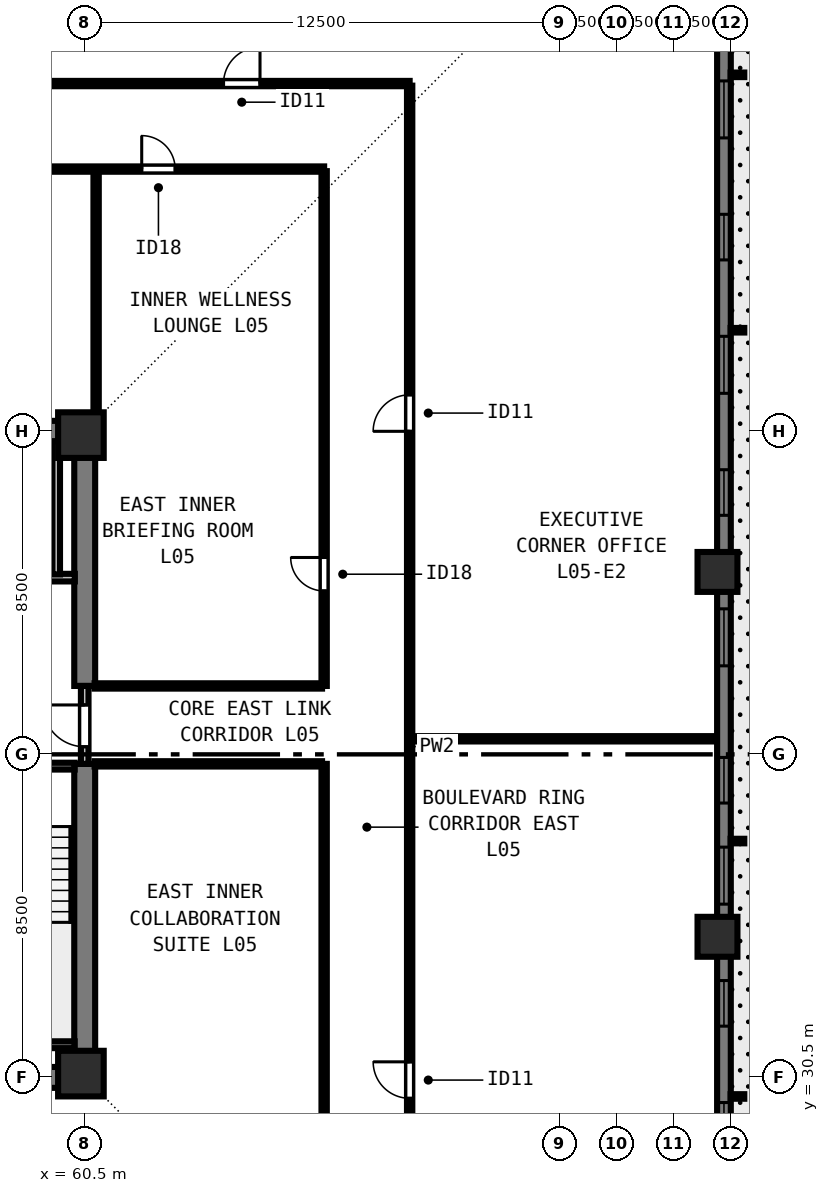
"""IFC4 building model, lengths in metres.
Left out: names, types, materials, properties, quantities, classifications, styles, units other than length and angle.
Written with IfcOpenShell. Run it as: python <this file> out.ifc"""

import sys

from ifc_helpers import new_model, si_unit, direction, frame, frame_2d, origin, origin_2d, place, context, subcontext, project, spatial, rectangle, extrude, element, fill, save


model = new_model("IFC4")
c1 = context("Model", 3, precision=1e-05, world=origin(), true_north=direction((0.0, 1.0)))
c2 = subcontext(c1, "Body", "Model", "MODEL_VIEW")
j1 = project(units=[si_unit("LENGTHUNIT", "METRE"), si_unit("PLANEANGLEUNIT", "RADIAN")], contexts=[c1])
p1 = place(None, origin())
s1 = spatial("IfcSite", under=j1, at=p1, CompositionType="ELEMENT")
p2 = place(p1, origin())
s2 = spatial("IfcBuilding", under=s1, at=p2, CompositionType="ELEMENT")
p3 = place(p2, frame((0.0, 0.0, 23.5)))
s3 = spatial("IfcBuildingStorey", under=s2, at=p3, CompositionType="ELEMENT", Elevation=23.5)
for number, where, z_axis, x_axis in (
    (1, (60.4, 30.6, 0.0), (0.0, 0.0, 1.0), (1.0, 0.0, 0.0)),
    (2, (60.4, 47.4, 0.0), (0.0, 0.0, 1.0), (1.0, 0.0, 0.0)),
):
    element("IfcColumn", number, at=place(p3, frame(where, z_axis=z_axis, x_axis=x_axis)), inside=s3, PredefinedType="COLUMN", context=c2, shape_type="SweptSolid", body=[
        extrude(rectangle(XDim=1.2, YDim=1.2, at=origin_2d()), origin(), (0.0, 0.0, 1.0), 3.5),
    ])
for number, where, z_axis, x_axis in (
    (3, (77.15, 34.2, 0.0), (0.0, 0.0, 1.0), (0.0, 1.0, 0.0)),
    (4, (77.15, 43.8, 0.0), (0.0, 0.0, 1.0), (0.0, 1.0, 0.0)),
):
    element("IfcColumn", number, at=place(p3, frame(where, z_axis=z_axis, x_axis=x_axis)), inside=s3, PredefinedType="COLUMN", context=c2, shape_type="SweptSolid", body=[
        extrude(rectangle(XDim=1.05, YDim=1.05, at=origin_2d()), origin(), (0.0, 0.0, 1.0), 3.5),
    ])
p4 = place(p3, frame((77.32, 61.5, 0.0), z_axis=(0.0, 0.0, 1.0), x_axis=(0.0, -1.0, 0.0)))
e5 = element("IfcWall", 5, at=p4, inside=s3, PredefinedType="SOLIDWALL", context=c2, shape_type="SweptSolid", body=[
    extrude(rectangle(XDim=44.662, YDim=0.36, at=frame_2d((22.331, 0.0))), origin(), (0.0, 0.0, 1.0), 3.28),
])
p5 = place(p4, frame((4.78, 0.0, 0.8)))
e6 = element("IfcOpeningElement", 6, at=p5, cuts=e5, PredefinedType="OPENING", context=c2, shape_type="SweptSolid", body=[
    extrude(rectangle(XDim=1.5, YDim=1.544, at=frame_2d((0.75, 0.772))), frame((0.0, 0.19, 0.0), z_axis=(0.0, -1.0, 0.0), x_axis=(1.0, 0.0, 0.0)), (0.0, 0.0, 1.0), 0.38),
])
p6 = place(p4, frame((8.29, 0.0, 0.8)))
e7 = element("IfcOpeningElement", 7, at=p6, cuts=e5, PredefinedType="OPENING", context=c2, shape_type="SweptSolid", body=[
    extrude(rectangle(XDim=1.2, YDim=1.544, at=frame_2d((0.6, 0.772))), frame((0.0, 0.19, 0.0), z_axis=(0.0, -1.0, 0.0), x_axis=(1.0, 0.0, 0.0)), (0.0, 0.0, 1.0), 0.38),
])
p7 = place(p4, frame((11.5, 0.0, 0.8)))
e8 = element("IfcOpeningElement", 8, at=p7, cuts=e5, PredefinedType="OPENING", context=c2, shape_type="SweptSolid", body=[
    extrude(rectangle(XDim=1.5, YDim=1.544, at=frame_2d((0.75, 0.772))), frame((0.0, 0.19, 0.0), z_axis=(0.0, -1.0, 0.0), x_axis=(1.0, 0.0, 0.0)), (0.0, 0.0, 1.0), 0.38),
])
p8 = place(p4, frame((15.01, 0.0, 0.8)))
e9 = element("IfcOpeningElement", 9, at=p8, cuts=e5, PredefinedType="OPENING", context=c2, shape_type="SweptSolid", body=[
    extrude(rectangle(XDim=1.2, YDim=1.544, at=frame_2d((0.6, 0.772))), frame((0.0, 0.19, 0.0), z_axis=(0.0, -1.0, 0.0), x_axis=(1.0, 0.0, 0.0)), (0.0, 0.0, 1.0), 0.38),
])
p9 = place(p4, frame((18.671, 0.0, 0.8)))
e10 = element("IfcOpeningElement", 10, at=p9, cuts=e5, PredefinedType="OPENING", context=c2, shape_type="SweptSolid", body=[
    extrude(rectangle(XDim=1.5, YDim=1.544, at=frame_2d((0.75, 0.772))), frame((0.0, 0.19, 0.0), z_axis=(0.0, -1.0, 0.0), x_axis=(1.0, 0.0, 0.0)), (0.0, 0.0, 1.0), 0.38),
])
p10 = place(p4, frame((22.581, 0.0, 0.8)))
e11 = element("IfcOpeningElement", 11, at=p10, cuts=e5, PredefinedType="OPENING", context=c2, shape_type="SweptSolid", body=[
    extrude(rectangle(XDim=1.2, YDim=1.544, at=frame_2d((0.6, 0.772))), frame((0.0, 0.19, 0.0), z_axis=(0.0, -1.0, 0.0), x_axis=(1.0, 0.0, 0.0)), (0.0, 0.0, 1.0), 0.38),
])
p11 = place(p4, frame((24.941, 0.0, 0.8)))
e12 = element("IfcOpeningElement", 12, at=p11, cuts=e5, PredefinedType="OPENING", context=c2, shape_type="SweptSolid", body=[
    extrude(rectangle(XDim=1.5, YDim=1.544, at=frame_2d((0.75, 0.772))), frame((0.0, 0.19, 0.0), z_axis=(0.0, -1.0, 0.0), x_axis=(1.0, 0.0, 0.0)), (0.0, 0.0, 1.0), 0.38),
])
p12 = place(p4, frame((28.451, 0.0, 0.8)))
e13 = element("IfcOpeningElement", 13, at=p12, cuts=e5, PredefinedType="OPENING", context=c2, shape_type="SweptSolid", body=[
    extrude(rectangle(XDim=1.2, YDim=1.544, at=frame_2d((0.6, 0.772))), frame((0.0, 0.19, 0.0), z_axis=(0.0, -1.0, 0.0), x_axis=(1.0, 0.0, 0.0)), (0.0, 0.0, 1.0), 0.38),
])
p13 = place(p4, frame((31.662, 0.0, 0.8)))
e14 = element("IfcOpeningElement", 14, at=p13, cuts=e5, PredefinedType="OPENING", context=c2, shape_type="SweptSolid", body=[
    extrude(rectangle(XDim=1.5, YDim=1.544, at=frame_2d((0.75, 0.772))), frame((0.0, 0.19, 0.0), z_axis=(0.0, -1.0, 0.0), x_axis=(1.0, 0.0, 0.0)), (0.0, 0.0, 1.0), 0.38),
])
p14 = place(p4, frame((35.172, 0.0, 0.8)))
e15 = element("IfcOpeningElement", 15, at=p14, cuts=e5, PredefinedType="OPENING", context=c2, shape_type="SweptSolid", body=[
    extrude(rectangle(XDim=1.2, YDim=1.544, at=frame_2d((0.6, 0.772))), frame((0.0, 0.19, 0.0), z_axis=(0.0, -1.0, 0.0), x_axis=(1.0, 0.0, 0.0)), (0.0, 0.0, 1.0), 0.38),
])
p15 = place(p4, frame((38.382, 0.0, 0.8)))
e16 = element("IfcOpeningElement", 16, at=p15, cuts=e5, PredefinedType="OPENING", context=c2, shape_type="SweptSolid", body=[
    extrude(rectangle(XDim=1.5, YDim=1.544, at=frame_2d((0.75, 0.772))), frame((0.0, 0.19, 0.0), z_axis=(0.0, -1.0, 0.0), x_axis=(1.0, 0.0, 0.0)), (0.0, 0.0, 1.0), 0.38),
])
for number, where, z_axis, x_axis in (
    (17, (43.225, 30.5, 0.0), (0.0, 0.0, 1.0), (1.0, 0.0, 0.0)),
    (18, (43.225, 47.5, 0.0), (0.0, 0.0, 1.0), (1.0, 0.0, 0.0)),
):
    element("IfcWall", number, at=place(p3, frame(where, z_axis=z_axis, x_axis=x_axis)), inside=s3, PredefinedType="SHEAR", context=c2, shape_type="SweptSolid", body=[
        extrude(rectangle(XDim=17.55, YDim=0.55, at=frame_2d((8.775, 0.0))), origin(), (0.0, 0.0, 1.0), 3.28),
    ])
p16 = place(p3, frame((60.5, 30.765, 0.0), z_axis=(0.0, 0.0, 1.0), x_axis=(0.0, 1.0, 0.0)))
e19 = element("IfcWall", 19, at=p16, inside=s3, PredefinedType="SHEAR", context=c2, shape_type="SweptSolid", body=[
    extrude(rectangle(XDim=7.985, YDim=0.55, at=frame_2d((3.993, 0.0))), origin(), (0.0, 0.0, 1.0), 3.28),
])
p17 = place(p3, frame((60.5, 40.8, 0.0), z_axis=(0.0, 0.0, 1.0), x_axis=(0.0, 1.0, 0.0)))
e20 = element("IfcWall", 20, at=p17, inside=s3, PredefinedType="SHEAR", context=c2, shape_type="SweptSolid", body=[
    extrude(rectangle(XDim=6.435, YDim=0.55, at=frame_2d((3.218, 0.0))), origin(), (0.0, 0.0, 1.0), 3.28),
])
p18 = place(p3, frame((60.5, 38.75, 0.0), z_axis=(0.0, 0.0, 1.0), x_axis=(0.0, 1.0, 0.0)))
e21 = element("IfcWall", 21, at=p18, inside=s3, PredefinedType="SOLIDWALL", context=c2, shape_type="SweptSolid", body=[
    extrude(rectangle(XDim=2.05, YDim=0.2, at=frame_2d((1.025, 0.0))), origin(), (0.0, 0.0, 1.0), 3.28),
])
p19 = place(p18, frame((0.45, 0.0, 0.0)))
e22 = element("IfcOpeningElement", 22, at=p19, cuts=e21, PredefinedType="OPENING", context=c2, shape_type="SweptSolid", body=[
    extrude(rectangle(XDim=1.1, YDim=2.15, at=frame_2d((0.55, 1.075))), frame((0.0, 0.11, 0.0), z_axis=(0.0, -1.0, 0.0), x_axis=(1.0, 0.0, 0.0)), (0.0, 0.0, 1.0), 0.22),
])
p20 = place(p3, frame((56.735, 43.65, 0.0), z_axis=(0.0, 0.0, 1.0), x_axis=(1.0, 0.0, 0.0)))
e23 = element("IfcWall", 23, at=p20, inside=s3, PredefinedType="SOLIDWALL", context=c2, shape_type="SweptSolid", body=[
    extrude(rectangle(XDim=3.505, YDim=0.2, at=frame_2d((1.752, 0.0))), origin(), (0.0, 0.0, 1.0), 3.28),
])
p21 = place(p20, frame((1.295, 0.0, 0.0)))
e24 = element("IfcOpeningElement", 24, at=p21, cuts=e23, PredefinedType="OPENING", context=c2, shape_type="SweptSolid", body=[
    extrude(rectangle(XDim=1.1, YDim=2.2, at=frame_2d((0.55, 1.1))), frame((0.0, 0.11, 0.0), z_axis=(0.0, -1.0, 0.0), x_axis=(1.0, 0.0, 0.0)), (0.0, 0.0, 1.0), 0.22),
])
p22 = place(p3, frame((59.75, 43.735, 0.0), z_axis=(0.0, 0.0, 1.0), x_axis=(0.0, 1.0, 0.0)))
e25 = element("IfcWall", 25, at=p22, inside=s3, PredefinedType="SOLIDWALL", context=c2, shape_type="SweptSolid", body=[
    extrude(rectangle(XDim=3.505, YDim=0.2, at=frame_2d((1.752, 0.0))), origin(), (0.0, 0.0, 1.0), 3.28),
])
p23 = place(p3, frame((34.95, 56.65, 0.0), z_axis=(0.0, 0.0, 1.0), x_axis=(1.0, 0.0, 0.0)))
e26 = element("IfcWall", 26, at=p23, inside=s3, PredefinedType="PARTITIONING", context=c2, shape_type="SweptSolid", body=[
    extrude(rectangle(XDim=34.1, YDim=0.14, at=frame_2d((17.05, 0.0))), origin(), (0.0, 0.0, 1.0), 3.28),
])
p24 = place(p23, frame((4.522, 0.0, 0.0)))
e27 = element("IfcOpeningElement", 27, at=p24, cuts=e26, PredefinedType="OPENING", context=c2, shape_type="SweptSolid", body=[
    extrude(rectangle(XDim=0.96, YDim=2.12, at=frame_2d((0.48, 1.06))), frame((0.0, 0.08, 0.0), z_axis=(0.0, -1.0, 0.0), x_axis=(1.0, 0.0, 0.0)), (0.0, 0.0, 1.0), 0.16),
])
p25 = place(p23, frame((29.202, 0.0, 0.0)))
e28 = element("IfcOpeningElement", 28, at=p25, cuts=e26, PredefinedType="OPENING", context=c2, shape_type="SweptSolid", body=[
    extrude(rectangle(XDim=0.96, YDim=2.12, at=frame_2d((0.48, 1.06))), frame((0.0, 0.08, 0.0), z_axis=(0.0, -1.0, 0.0), x_axis=(1.0, 0.0, 0.0)), (0.0, 0.0, 1.0), 0.16),
])
p26 = place(p3, frame((69.05, 21.405, 0.0), z_axis=(0.0, 0.0, 1.0), x_axis=(0.0, 1.0, 0.0)))
e29 = element("IfcWall", 29, at=p26, inside=s3, PredefinedType="PARTITIONING", context=c2, shape_type="SweptSolid", body=[
    extrude(rectangle(XDim=35.19, YDim=0.14, at=frame_2d((17.595, 0.0))), origin(), (0.0, 0.0, 1.0), 3.28),
])
p27 = place(p26, frame((8.545, 0.0, 0.0)))
e30 = element("IfcOpeningElement", 30, at=p27, cuts=e29, PredefinedType="OPENING", context=c2, shape_type="SweptSolid", body=[
    extrude(rectangle(XDim=0.96, YDim=2.12, at=frame_2d((0.48, 1.06))), frame((0.0, 0.08, 0.0), z_axis=(0.0, -1.0, 0.0), x_axis=(1.0, 0.0, 0.0)), (0.0, 0.0, 1.0), 0.16),
])
p28 = place(p26, frame((26.095, 0.0, 0.0)))
e31 = element("IfcOpeningElement", 31, at=p28, cuts=e29, PredefinedType="OPENING", context=c2, shape_type="SweptSolid", body=[
    extrude(rectangle(XDim=0.96, YDim=2.12, at=frame_2d((0.48, 1.06))), frame((0.0, 0.08, 0.0), z_axis=(0.0, -1.0, 0.0), x_axis=(1.0, 0.0, 0.0)), (0.0, 0.0, 1.0), 0.16),
])
p29 = place(p3, frame((37.2, 54.4, 0.0), z_axis=(0.0, 0.0, 1.0), x_axis=(1.0, 0.0, 0.0)))
e32 = element("IfcWall", 32, at=p29, inside=s3, PredefinedType="PARTITIONING", context=c2, shape_type="SweptSolid", body=[
    extrude(rectangle(XDim=29.6, YDim=0.14, at=frame_2d((14.8, 0.0))), origin(), (0.0, 0.0, 1.0), 3.28),
])
p30 = place(p29, frame((2.2, 0.0, 0.0)))
e33 = element("IfcOpeningElement", 33, at=p30, cuts=e32, PredefinedType="OPENING", context=c2, shape_type="SweptSolid", body=[
    extrude(rectangle(XDim=0.88, YDim=2.1, at=frame_2d((0.44, 1.05))), frame((0.0, 0.08, 0.0), z_axis=(0.0, -1.0, 0.0), x_axis=(1.0, 0.0, 0.0)), (0.0, 0.0, 1.0), 0.16),
])
p31 = place(p29, frame((15.3, 0.0, 0.0)))
e34 = element("IfcOpeningElement", 34, at=p31, cuts=e32, PredefinedType="OPENING", context=c2, shape_type="SweptSolid", body=[
    extrude(rectangle(XDim=0.88, YDim=2.1, at=frame_2d((0.44, 1.05))), frame((0.0, 0.08, 0.0), z_axis=(0.0, -1.0, 0.0), x_axis=(1.0, 0.0, 0.0)), (0.0, 0.0, 1.0), 0.16),
])
p32 = place(p29, frame((24.8, 0.0, 0.0)))
e35 = element("IfcOpeningElement", 35, at=p32, cuts=e32, PredefinedType="OPENING", context=c2, shape_type="SweptSolid", body=[
    extrude(rectangle(XDim=0.88, YDim=2.1, at=frame_2d((0.44, 1.05))), frame((0.0, 0.08, 0.0), z_axis=(0.0, -1.0, 0.0), x_axis=(1.0, 0.0, 0.0)), (0.0, 0.0, 1.0), 0.16),
])
p33 = place(p3, frame((66.8, 23.655, 0.0), z_axis=(0.0, 0.0, 1.0), x_axis=(0.0, 1.0, 0.0)))
e36 = element("IfcWall", 36, at=p33, inside=s3, PredefinedType="PARTITIONING", context=c2, shape_type="SweptSolid", body=[
    extrude(rectangle(XDim=15.095, YDim=0.14, at=frame_2d((7.547, 0.0))), origin(), (0.0, 0.0, 1.0), 3.28),
])
p34 = place(p33, frame((2.445, 0.0, 0.0)))
e37 = element("IfcOpeningElement", 37, at=p34, cuts=e36, PredefinedType="OPENING", context=c2, shape_type="SweptSolid", body=[
    extrude(rectangle(XDim=0.88, YDim=2.1, at=frame_2d((0.44, 1.05))), frame((0.0, 0.08, 0.0), z_axis=(0.0, -1.0, 0.0), x_axis=(1.0, 0.0, 0.0)), (0.0, 0.0, 1.0), 0.16),
])
p35 = place(p3, frame((66.8, 40.8, 0.0), z_axis=(0.0, 0.0, 1.0), x_axis=(0.0, 1.0, 0.0)))
e38 = element("IfcWall", 38, at=p35, inside=s3, PredefinedType="PARTITIONING", context=c2, shape_type="SweptSolid", body=[
    extrude(rectangle(XDim=13.545, YDim=0.14, at=frame_2d((6.772, 0.0))), origin(), (0.0, 0.0, 1.0), 3.28),
])
p36 = place(p35, frame((2.5, 0.0, 0.0)))
e39 = element("IfcOpeningElement", 39, at=p36, cuts=e38, PredefinedType="OPENING", context=c2, shape_type="SweptSolid", body=[
    extrude(rectangle(XDim=0.88, YDim=2.1, at=frame_2d((0.44, 1.05))), frame((0.0, 0.08, 0.0), z_axis=(0.0, -1.0, 0.0), x_axis=(1.0, 0.0, 0.0)), (0.0, 0.0, 1.0), 0.16),
])
for number, where, z_axis, x_axis in (
    (40, (60.76, 38.75, 0.0), (0.0, 0.0, 1.0), (1.0, 0.0, 0.0)),
    (41, (60.76, 40.8, 0.0), (0.0, 0.0, 1.0), (1.0, 0.0, 0.0)),
):
    element("IfcWall", number, at=place(p3, frame(where, z_axis=z_axis, x_axis=x_axis)), inside=s3, PredefinedType="PARTITIONING", context=c2, shape_type="SweptSolid", body=[
        extrude(rectangle(XDim=5.985, YDim=0.14, at=frame_2d((2.993, 0.0))), origin(), (0.0, 0.0, 1.0), 3.28),
    ])
p37 = place(p3, frame((60.8, 47.76, 0.0), z_axis=(0.0, 0.0, 1.0), x_axis=(0.0, 1.0, 0.0)))
e42 = element("IfcWall", 42, at=p37, inside=s3, PredefinedType="PARTITIONING", context=c2, shape_type="SweptSolid", body=[
    extrude(rectangle(XDim=6.585, YDim=0.14, at=frame_2d((3.292, 0.0))), origin(), (0.0, 0.0, 1.0), 2.439),
])
p38 = place(p3, frame((69.15, 39.409, 0.0), z_axis=(0.0, 0.0, 1.0), x_axis=(1.0, 0.0, 0.0)))
e43 = element("IfcWall", 43, at=p38, inside=s3, PredefinedType="PARTITIONING", context=c2, shape_type="SweptSolid", body=[
    extrude(rectangle(XDim=7.93, YDim=0.14, at=frame_2d((3.965, 0.0))), origin(), (0.0, 0.0, 1.0), 3.28),
])
p39 = place(p3, frame((57.005, 38.69, 0.0), z_axis=(0.0, 0.0, 1.0), x_axis=(1.0, 0.0, 0.0)))
e44 = element("IfcWall", 44, at=p39, inside=s3, PredefinedType="SOLIDWALL", context=c2, shape_type="SweptSolid", body=[
    extrude(rectangle(XDim=3.23, YDim=0.18, at=frame_2d((1.615, 0.0))), origin(), (0.0, 0.0, 1.0), 3.28),
])
p40 = place(p39, frame((1.14, 0.0, 0.0)))
e45 = element("IfcOpeningElement", 45, at=p40, cuts=e44, PredefinedType="OPENING", context=c2, shape_type="SweptSolid", body=[
    extrude(rectangle(XDim=0.95, YDim=2.15, at=frame_2d((0.475, 1.075))), frame((0.0, 0.1, 0.0), z_axis=(0.0, -1.0, 0.0), x_axis=(1.0, 0.0, 0.0)), (0.0, 0.0, 1.0), 0.2),
])
p41 = place(p3, frame((57.005, 31.36, 0.0), z_axis=(0.0, 0.0, 1.0), x_axis=(1.0, 0.0, 0.0)))
e46 = element("IfcWall", 46, at=p41, inside=s3, PredefinedType="SOLIDWALL", context=c2, shape_type="SweptSolid", body=[
    extrude(rectangle(XDim=3.23, YDim=0.18, at=frame_2d((1.615, 0.0))), origin(), (0.0, 0.0, 1.0), 3.28),
])
p42 = place(p5, origin())
e47 = element("IfcWindow", 47, at=p42, inside=s3, PartitioningType="SINGLE_PANEL", PredefinedType="WINDOW", context=c2, shape_type="SweptSolid", body=[
    extrude(rectangle(XDim=1.5, YDim=1.544, at=frame_2d((0.75, 0.772))), frame((0.0, -0.05, 0.0), z_axis=(0.0, -1.0, 0.0), x_axis=(1.0, 0.0, 0.0)), (0.0, 0.0, 1.0), 0.06),
])
fill(e6, e47)
p43 = place(p6, origin())
e48 = element("IfcWindow", 48, at=p43, inside=s3, PartitioningType="SINGLE_PANEL", PredefinedType="WINDOW", context=c2, shape_type="SweptSolid", body=[
    extrude(rectangle(XDim=1.2, YDim=1.544, at=frame_2d((0.6, 0.772))), frame((0.0, -0.05, 0.0), z_axis=(0.0, -1.0, 0.0), x_axis=(1.0, 0.0, 0.0)), (0.0, 0.0, 1.0), 0.06),
])
fill(e7, e48)
p44 = place(p7, origin())
e49 = element("IfcWindow", 49, at=p44, inside=s3, PartitioningType="SINGLE_PANEL", PredefinedType="WINDOW", context=c2, shape_type="SweptSolid", body=[
    extrude(rectangle(XDim=1.5, YDim=1.544, at=frame_2d((0.75, 0.772))), frame((0.0, -0.05, 0.0), z_axis=(0.0, -1.0, 0.0), x_axis=(1.0, 0.0, 0.0)), (0.0, 0.0, 1.0), 0.06),
])
fill(e8, e49)
p45 = place(p8, origin())
e50 = element("IfcWindow", 50, at=p45, inside=s3, PartitioningType="SINGLE_PANEL", PredefinedType="WINDOW", context=c2, shape_type="SweptSolid", body=[
    extrude(rectangle(XDim=1.2, YDim=1.544, at=frame_2d((0.6, 0.772))), frame((0.0, -0.05, 0.0), z_axis=(0.0, -1.0, 0.0), x_axis=(1.0, 0.0, 0.0)), (0.0, 0.0, 1.0), 0.06),
])
fill(e9, e50)
p46 = place(p9, origin())
e51 = element("IfcWindow", 51, at=p46, inside=s3, PartitioningType="SINGLE_PANEL", PredefinedType="WINDOW", context=c2, shape_type="SweptSolid", body=[
    extrude(rectangle(XDim=1.5, YDim=1.544, at=frame_2d((0.75, 0.772))), frame((0.0, -0.05, 0.0), z_axis=(0.0, -1.0, 0.0), x_axis=(1.0, 0.0, 0.0)), (0.0, 0.0, 1.0), 0.06),
])
fill(e10, e51)
p47 = place(p10, origin())
e52 = element("IfcWindow", 52, at=p47, inside=s3, PartitioningType="SINGLE_PANEL", PredefinedType="WINDOW", context=c2, shape_type="SweptSolid", body=[
    extrude(rectangle(XDim=1.2, YDim=1.544, at=frame_2d((0.6, 0.772))), frame((0.0, -0.05, 0.0), z_axis=(0.0, -1.0, 0.0), x_axis=(1.0, 0.0, 0.0)), (0.0, 0.0, 1.0), 0.06),
])
fill(e11, e52)
p48 = place(p11, origin())
e53 = element("IfcWindow", 53, at=p48, inside=s3, PartitioningType="SINGLE_PANEL", PredefinedType="WINDOW", context=c2, shape_type="SweptSolid", body=[
    extrude(rectangle(XDim=1.5, YDim=1.544, at=frame_2d((0.75, 0.772))), frame((0.0, -0.05, 0.0), z_axis=(0.0, -1.0, 0.0), x_axis=(1.0, 0.0, 0.0)), (0.0, 0.0, 1.0), 0.06),
])
fill(e12, e53)
p49 = place(p12, origin())
e54 = element("IfcWindow", 54, at=p49, inside=s3, PartitioningType="SINGLE_PANEL", PredefinedType="WINDOW", context=c2, shape_type="SweptSolid", body=[
    extrude(rectangle(XDim=1.2, YDim=1.544, at=frame_2d((0.6, 0.772))), frame((0.0, -0.05, 0.0), z_axis=(0.0, -1.0, 0.0), x_axis=(1.0, 0.0, 0.0)), (0.0, 0.0, 1.0), 0.06),
])
fill(e13, e54)
p50 = place(p13, origin())
e55 = element("IfcWindow", 55, at=p50, inside=s3, PartitioningType="SINGLE_PANEL", PredefinedType="WINDOW", context=c2, shape_type="SweptSolid", body=[
    extrude(rectangle(XDim=1.5, YDim=1.544, at=frame_2d((0.75, 0.772))), frame((0.0, -0.05, 0.0), z_axis=(0.0, -1.0, 0.0), x_axis=(1.0, 0.0, 0.0)), (0.0, 0.0, 1.0), 0.06),
])
fill(e14, e55)
p51 = place(p19, origin())
e56 = element("IfcDoor", 56, at=p51, inside=s3, OperationType="SINGLE_SWING_RIGHT", PredefinedType="DOOR", context=c2, shape_type="SweptSolid", body=[
    extrude(rectangle(XDim=1.1, YDim=2.15, at=frame_2d((0.55, 1.075))), frame((0.0, 0.025, 0.0), z_axis=(0.0, -1.0, 0.0), x_axis=(1.0, 0.0, 0.0)), (0.0, 0.0, 1.0), 0.05),
])
fill(e22, e56)
p52 = place(p32, origin())
e57 = element("IfcDoor", 57, at=p52, inside=s3, OperationType="SINGLE_SWING_LEFT", PredefinedType="DOOR", context=c2, shape_type="SweptSolid", body=[
    extrude(rectangle(XDim=0.88, YDim=2.1, at=frame_2d((0.44, 1.05))), frame((0.0, 0.025, 0.0), z_axis=(0.0, -1.0, 0.0), x_axis=(1.0, 0.0, 0.0)), (0.0, 0.0, 1.0), 0.05),
])
fill(e35, e57)
p53 = place(p36, origin())
e58 = element("IfcDoor", 58, at=p53, inside=s3, OperationType="SINGLE_SWING_RIGHT", PredefinedType="DOOR", context=c2, shape_type="SweptSolid", body=[
    extrude(rectangle(XDim=0.88, YDim=2.1, at=frame_2d((0.44, 1.05))), frame((0.0, 0.025, 0.0), z_axis=(0.0, -1.0, 0.0), x_axis=(1.0, 0.0, 0.0)), (0.0, 0.0, 1.0), 0.05),
])
fill(e39, e58)
p54 = place(p25, origin())
e59 = element("IfcDoor", 59, at=p54, inside=s3, OperationType="SINGLE_SWING_RIGHT", PredefinedType="DOOR", context=c2, shape_type="SweptSolid", body=[
    extrude(rectangle(XDim=0.96, YDim=2.12, at=frame_2d((0.48, 1.06))), frame((0.0, 0.025, 0.0), z_axis=(0.0, -1.0, 0.0), x_axis=(1.0, 0.0, 0.0)), (0.0, 0.0, 1.0), 0.05),
])
fill(e28, e59)
p55 = place(p27, origin())
e60 = element("IfcDoor", 60, at=p55, inside=s3, OperationType="SINGLE_SWING_RIGHT", PredefinedType="DOOR", context=c2, shape_type="SweptSolid", body=[
    extrude(rectangle(XDim=0.96, YDim=2.12, at=frame_2d((0.48, 1.06))), frame((0.0, 0.025, 0.0), z_axis=(0.0, -1.0, 0.0), x_axis=(1.0, 0.0, 0.0)), (0.0, 0.0, 1.0), 0.05),
])
fill(e30, e60)
p56 = place(p28, origin())
e61 = element("IfcDoor", 61, at=p56, inside=s3, OperationType="SINGLE_SWING_LEFT", PredefinedType="DOOR", context=c2, shape_type="SweptSolid", body=[
    extrude(rectangle(XDim=0.96, YDim=2.12, at=frame_2d((0.48, 1.06))), frame((0.0, 0.025, 0.0), z_axis=(0.0, -1.0, 0.0), x_axis=(1.0, 0.0, 0.0)), (0.0, 0.0, 1.0), 0.05),
])
fill(e31, e61)
save(model, sys.argv[1])
